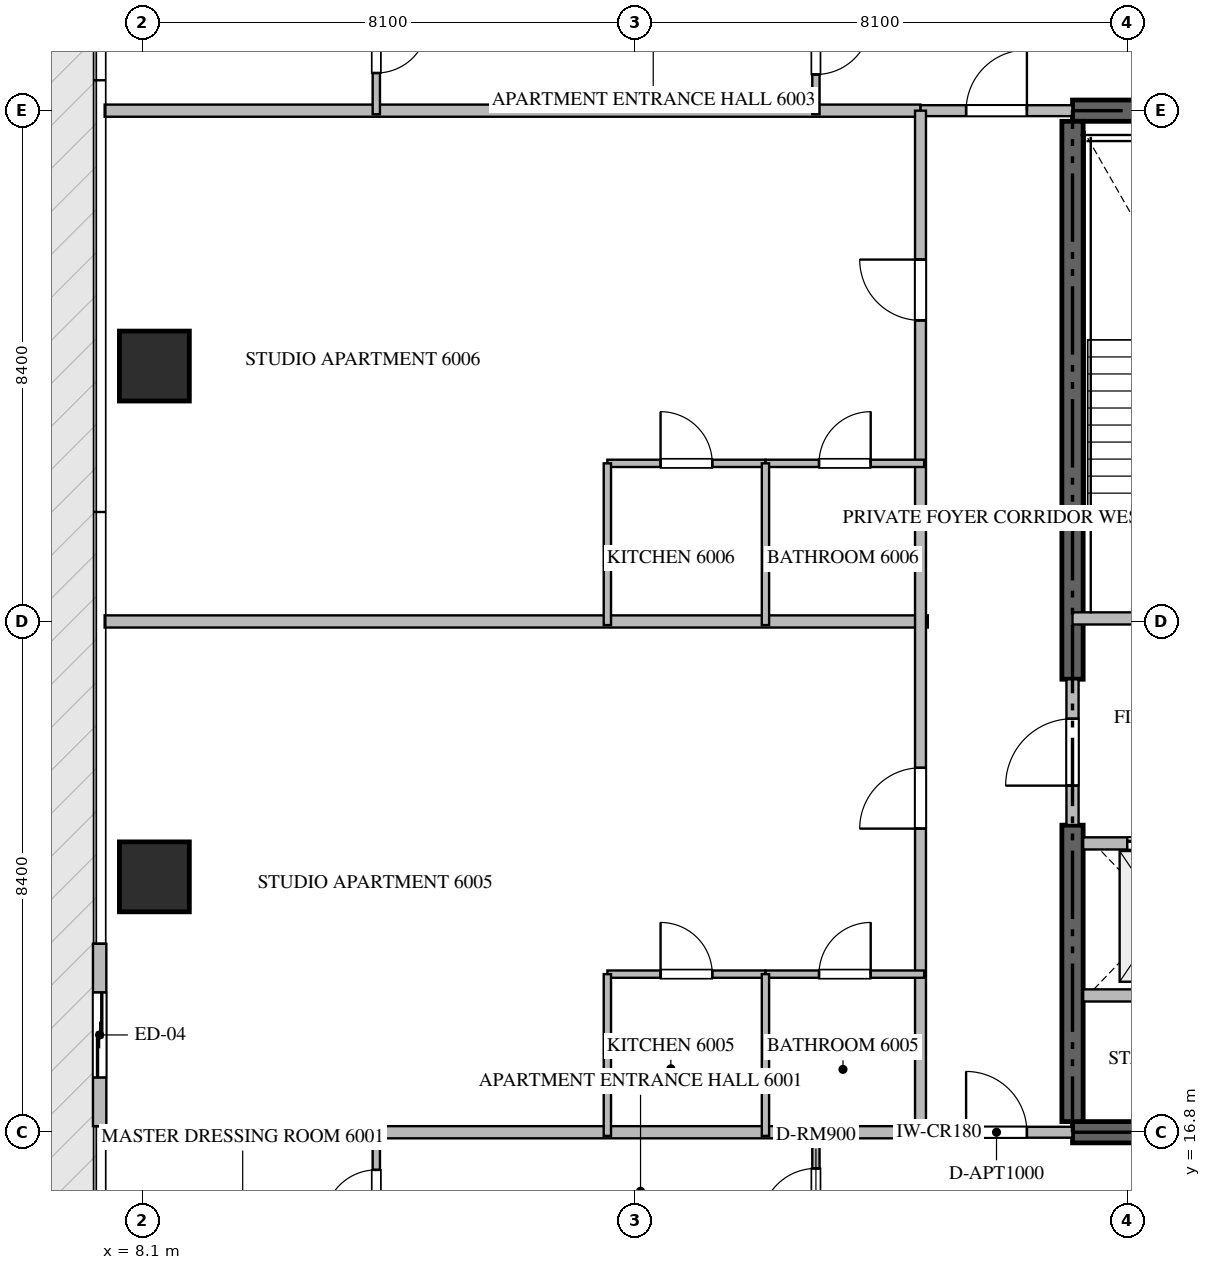
"""IFC4 building model, lengths in metres.
Left out: names, types, materials, properties, quantities, classifications, styles, units other than length and angle.
Written with IfcOpenShell. Run it as: python <this file> out.ifc"""

import sys

from ifc_helpers import new_model, si_unit, direction, frame, frame_2d, origin, origin_2d, place, context, subcontext, project, spatial, rectangle, extrude, source, transform, mapped, element, fill, save


model = new_model("IFC4")
c1 = context("Model", 3, precision=1e-05, world=origin(), true_north=direction((0.0, 1.0)))
c2 = subcontext(c1, "Body", "Model", "MODEL_VIEW")
j1 = project(units=[si_unit("LENGTHUNIT", "METRE"), si_unit("PLANEANGLEUNIT", "RADIAN")], contexts=[c1])
p1 = place(None, origin())
s1 = spatial("IfcSite", under=j1, at=p1, CompositionType="ELEMENT")
p2 = place(p1, origin())
s2 = spatial("IfcBuilding", under=s1, at=p2, CompositionType="ELEMENT")
p3 = place(p2, frame((0.0, 0.0, 241.25)))
s3 = spatial("IfcBuildingStorey", under=s2, at=p3, CompositionType="ELEMENT", Elevation=241.25)
for number, where, z_axis, x_axis in (
    (1, (23.4, 16.8, -0.26), (0.0, 0.0, 1.0), (1.0, 0.0, 0.0)),
    (2, (41.4, 33.6, -0.26), (0.0, 0.0, 1.0), (-1.0, 0.0, 0.0)),
):
    element("IfcWall", number, at=place(p3, frame(where, z_axis=z_axis, x_axis=x_axis)), inside=s3, PredefinedType="SHEAR", context=c2, shape_type="SweptSolid", body=[
        extrude(rectangle(XDim=18.0, YDim=0.35, at=frame_2d((9.0, 0.0))), origin(), (0.0, 0.0, 1.0), 3.848),
    ])
p4 = place(p3, frame((23.4, 16.975, -0.26), z_axis=(0.0, 0.0, 1.0), x_axis=(0.0, 1.0, 0.0)))
e3 = element("IfcWall", 3, at=p4, inside=s3, PredefinedType="SHEAR", context=c2, shape_type="SweptSolid", body=[
    extrude(rectangle(XDim=4.875, YDim=0.35, at=frame_2d((2.438, 0.0))), origin(), (0.0, 0.0, 1.0), 3.848),
])
p5 = place(p3, frame((23.4, 24.25, -0.26), z_axis=(0.0, 0.0, 1.0), x_axis=(0.0, 1.0, 0.0)))
e4 = element("IfcWall", 4, at=p5, inside=s3, PredefinedType="SHEAR", context=c2, shape_type="SweptSolid", body=[
    extrude(rectangle(XDim=9.175, YDim=0.35, at=frame_2d((4.587, 0.0))), origin(), (0.0, 0.0, 1.0), 3.848),
])
m1 = source(origin(), c2, "Body", "SweptSolid", [
    extrude(rectangle(XDim=1.15, YDim=1.15, at=origin_2d()), origin(), (0.0, 0.0, 1.0), 3.85),
])
for number, where, z_axis, x_axis in (
    (5, (8.3, 21.0, -0.26), (0.0, 0.0, 1.0), (1.0, 0.0, 0.0)),
    (6, (8.3, 29.4, -0.26), (0.0, 0.0, 1.0), (1.0, 0.0, 0.0)),
):
    element("IfcColumn", number, at=place(p3, frame(where, z_axis=z_axis, x_axis=x_axis)), inside=s3, PredefinedType="COLUMN", context=c2, shape_type="MappedRepresentation", body=[
        mapped(m1, transform((0.0, 0.0, 0.0), scale=1.0)),
    ])
p6 = place(p3, frame((7.4, 19.9, 0.0), z_axis=(0.0, 0.0, 1.0), x_axis=(0.0, -1.0, 0.0)))
e7 = element("IfcWall", 7, at=p6, inside=s3, PredefinedType="ELEMENTEDWALL", context=c2, shape_type="SweptSolid", body=[
    extrude(rectangle(XDim=3.0, YDim=0.22, at=frame_2d((1.5, 0.0))), origin(), (0.0, 0.0, 1.0), 3.575),
])
p7 = place(p6, frame((0.8, 0.0, 0.0)))
e8 = element("IfcOpeningElement", 8, at=p7, cuts=e7, PredefinedType="OPENING", context=c2, shape_type="SweptSolid", body=[
    extrude(rectangle(XDim=1.4, YDim=2.25, at=frame_2d((0.7, 1.125))), frame((0.0, 0.12, 0.0), z_axis=(0.0, -1.0, 0.0), x_axis=(1.0, 0.0, 0.0)), (0.0, 0.0, 1.0), 0.24),
])
p8 = place(p3, frame((23.4, 25.25, 0.0), z_axis=(0.0, 0.0, 1.0), x_axis=(1.0, 0.0, 0.0)))
e9 = element("IfcWall", 9, at=p8, inside=s3, PredefinedType="STANDARD", context=c2, shape_type="SweptSolid", body=[
    extrude(rectangle(XDim=4.45, YDim=0.2, at=frame_2d((2.225, 0.0))), origin(), (0.0, 0.0, 1.0), 3.59),
])
p9 = place(p8, frame((1.65, 0.0, 0.0)))
e10 = element("IfcOpeningElement", 10, at=p9, cuts=e9, PredefinedType="OPENING", context=c2, shape_type="SweptSolid", body=[
    extrude(rectangle(XDim=1.1, YDim=2.15, at=frame_2d((0.55, 1.075))), frame((0.0, 0.11, 0.0), z_axis=(0.0, -1.0, 0.0), x_axis=(1.0, 0.0, 0.0)), (0.0, 0.0, 1.0), 0.22),
])
p10 = place(p3, frame((23.575, 21.55, 0.0), z_axis=(0.0, 0.0, 1.0), x_axis=(1.0, 0.0, 0.0)))
e11 = element("IfcWall", 11, at=p10, inside=s3, PredefinedType="STANDARD", context=c2, shape_type="SweptSolid", body=[
    extrude(rectangle(XDim=2.475, YDim=0.2, at=frame_2d((1.238, 0.0))), origin(), (0.0, 0.0, 1.0), 3.59),
])
p11 = place(p10, frame((0.725, 0.0, 0.0)))
e12 = element("IfcOpeningElement", 12, at=p11, cuts=e11, PredefinedType="OPENING", context=c2, shape_type="SweptSolid", body=[
    extrude(rectangle(XDim=1.2, YDim=2.2, at=frame_2d((0.6, 1.1))), frame((0.0, 0.11, 0.0), z_axis=(0.0, -1.0, 0.0), x_axis=(1.0, 0.0, 0.0)), (0.0, 0.0, 1.0), 0.22),
])
p12 = place(p3, frame((23.575, 19.05, 0.0), z_axis=(0.0, 0.0, 1.0), x_axis=(1.0, 0.0, 0.0)))
e13 = element("IfcWall", 13, at=p12, inside=s3, PredefinedType="STANDARD", context=c2, shape_type="SweptSolid", body=[
    extrude(rectangle(XDim=2.475, YDim=0.2, at=frame_2d((1.238, 0.0))), origin(), (0.0, 0.0, 1.0), 3.59),
])
p13 = place(p3, frame((23.4, 21.852, 0.0), z_axis=(0.0, 0.0, 1.0), x_axis=(0.0, 1.0, 0.0)))
e14 = element("IfcWall", 14, at=p13, inside=s3, PredefinedType="STANDARD", context=c2, shape_type="SweptSolid", body=[
    extrude(rectangle(XDim=2.396, YDim=0.2, at=frame_2d((1.198, 0.0))), origin(), (0.0, 0.0, 1.0), 3.59),
])
p14 = place(p13, frame((0.648, 0.0, 0.0)))
e15 = element("IfcOpeningElement", 15, at=p14, cuts=e14, PredefinedType="OPENING", context=c2, shape_type="SweptSolid", body=[
    extrude(rectangle(XDim=1.1, YDim=2.15, at=frame_2d((0.55, 1.075))), frame((0.0, 0.11, 0.0), z_axis=(0.0, -1.0, 0.0), x_axis=(1.0, 0.0, 0.0)), (0.0, 0.0, 1.0), 0.22),
])
p15 = place(p3, frame((7.482, 25.2, 0.0), z_axis=(0.0, 0.0, 1.0), x_axis=(1.0, 0.0, 0.0)))
e16 = element("IfcWall", 16, at=p15, inside=s3, PredefinedType="PARTITIONING", context=c2, shape_type="SweptSolid", body=[
    extrude(rectangle(XDim=13.538, YDim=0.2, at=frame_2d((6.769, 0.0))), origin(), (0.0, 0.0, 1.0), 3.59),
])
for number, where, z_axis, x_axis in (
    (17, (7.482, 16.8, 0.0), (0.0, 0.0, 1.0), (1.0, 0.0, 0.0)),
    (18, (7.482, 33.6, 0.0), (0.0, 0.0, 1.0), (1.0, 0.0, 0.0)),
):
    element("IfcWall", number, at=place(p3, frame(where, z_axis=z_axis, x_axis=x_axis)), inside=s3, PredefinedType="PARTITIONING", context=c2, shape_type="SweptSolid", body=[
        extrude(rectangle(XDim=13.418, YDim=0.2, at=frame_2d((6.709, 0.0))), origin(), (0.0, 0.0, 1.0), 3.59),
    ])
p16 = place(p3, frame((20.902, 16.8, 0.0), z_axis=(0.0, 0.0, 1.0), x_axis=(1.0, 0.0, 0.0)))
e19 = element("IfcWall", 19, at=p16, inside=s3, PredefinedType="PARTITIONING", context=c2, shape_type="SweptSolid", body=[
    extrude(rectangle(XDim=2.496, YDim=0.18, at=frame_2d((1.248, 0.0))), origin(), (0.0, 0.0, 1.0), 3.59),
])
p17 = place(p16, frame((0.748, 0.0, 0.0)))
e20 = element("IfcOpeningElement", 20, at=p17, cuts=e19, PredefinedType="OPENING", context=c2, shape_type="SweptSolid", body=[
    extrude(rectangle(XDim=1.0, YDim=2.15, at=frame_2d((0.5, 1.075))), frame((0.0, 0.1, 0.0), z_axis=(0.0, -1.0, 0.0), x_axis=(1.0, 0.0, 0.0)), (0.0, 0.0, 1.0), 0.2),
])
p18 = place(p3, frame((20.902, 33.6, 0.0), z_axis=(0.0, 0.0, 1.0), x_axis=(1.0, 0.0, 0.0)))
e21 = element("IfcWall", 21, at=p18, inside=s3, PredefinedType="PARTITIONING", context=c2, shape_type="SweptSolid", body=[
    extrude(rectangle(XDim=2.496, YDim=0.18, at=frame_2d((1.248, 0.0))), origin(), (0.0, 0.0, 1.0), 3.59),
])
p19 = place(p18, frame((0.748, 0.0, 0.0)))
e22 = element("IfcOpeningElement", 22, at=p19, cuts=e21, PredefinedType="OPENING", context=c2, shape_type="SweptSolid", body=[
    extrude(rectangle(XDim=1.0, YDim=2.15, at=frame_2d((0.5, 1.075))), frame((0.0, 0.1, 0.0), z_axis=(0.0, -1.0, 0.0), x_axis=(1.0, 0.0, 0.0)), (0.0, 0.0, 1.0), 0.2),
])
p20 = place(p3, frame((20.9, 16.8, 0.0), z_axis=(0.0, 0.0, 1.0), x_axis=(0.0, 1.0, 0.0)))
e23 = element("IfcWall", 23, at=p20, inside=s3, PredefinedType="PARTITIONING", context=c2, shape_type="SweptSolid", body=[
    extrude(rectangle(XDim=16.8, YDim=0.18, at=frame_2d((8.4, 0.0))), origin(), (0.0, 0.0, 1.0), 3.59),
])
p21 = place(p20, frame((4.993, 0.0, 0.0)))
e24 = element("IfcOpeningElement", 24, at=p21, cuts=e23, PredefinedType="OPENING", context=c2, shape_type="SweptSolid", body=[
    extrude(rectangle(XDim=1.0, YDim=2.15, at=frame_2d((0.5, 1.075))), frame((0.0, 0.1, 0.0), z_axis=(0.0, -1.0, 0.0), x_axis=(1.0, 0.0, 0.0)), (0.0, 0.0, 1.0), 0.2),
])
p22 = place(p20, frame((13.351, 0.0, 0.0)))
e25 = element("IfcOpeningElement", 25, at=p22, cuts=e23, PredefinedType="OPENING", context=c2, shape_type="SweptSolid", body=[
    extrude(rectangle(XDim=1.0, YDim=2.15, at=frame_2d((0.5, 1.075))), frame((0.0, 0.1, 0.0), z_axis=(0.0, -1.0, 0.0), x_axis=(1.0, 0.0, 0.0)), (0.0, 0.0, 1.0), 0.2),
])
p23 = place(p3, frame((19.18, 14.65, 0.0), z_axis=(0.0, 0.0, 1.0), x_axis=(0.0, 1.0, 0.0)))
e26 = element("IfcWall", 26, at=p23, inside=s3, PredefinedType="PARTITIONING", context=c2, shape_type="SweptSolid", body=[
    extrude(rectangle(XDim=2.21, YDim=0.12, at=frame_2d((1.105, 0.0))), origin(), (0.0, 0.0, 1.0), 3.59),
])
p24 = place(p23, frame((0.655, 0.0, 0.0)))
e27 = element("IfcOpeningElement", 27, at=p24, cuts=e26, PredefinedType="OPENING", context=c2, shape_type="SweptSolid", body=[
    extrude(rectangle(XDim=0.9, YDim=2.1, at=frame_2d((0.45, 1.05))), frame((0.0, 0.07, 0.0), z_axis=(0.0, -1.0, 0.0), x_axis=(1.0, 0.0, 0.0)), (0.0, 0.0, 1.0), 0.14),
])
p25 = place(p3, frame((11.95, 14.652, 0.0), z_axis=(0.0, 0.0, 1.0), x_axis=(0.0, 1.0, 0.0)))
e28 = element("IfcWall", 28, at=p25, inside=s3, PredefinedType="PARTITIONING", context=c2, shape_type="SweptSolid", body=[
    extrude(rectangle(XDim=2.208, YDim=0.12, at=frame_2d((1.104, 0.0))), origin(), (0.0, 0.0, 1.0), 3.59),
])
p26 = place(p25, frame((0.679, 0.0, 0.0)))
e29 = element("IfcOpeningElement", 29, at=p26, cuts=e28, PredefinedType="OPENING", context=c2, shape_type="SweptSolid", body=[
    extrude(rectangle(XDim=0.85, YDim=2.1, at=frame_2d((0.425, 1.05))), frame((0.0, 0.07, 0.0), z_axis=(0.0, -1.0, 0.0), x_axis=(1.0, 0.0, 0.0)), (0.0, 0.0, 1.0), 0.14),
])
p27 = place(p3, frame((19.18, 35.75, 0.0), z_axis=(0.0, 0.0, 1.0), x_axis=(0.0, -1.0, 0.0)))
e30 = element("IfcWall", 30, at=p27, inside=s3, PredefinedType="PARTITIONING", context=c2, shape_type="SweptSolid", body=[
    extrude(rectangle(XDim=2.21, YDim=0.12, at=frame_2d((1.105, 0.0))), origin(), (0.0, 0.0, 1.0), 3.59),
])
p28 = place(p27, frame((0.655, 0.0, 0.0)))
e31 = element("IfcOpeningElement", 31, at=p28, cuts=e30, PredefinedType="OPENING", context=c2, shape_type="SweptSolid", body=[
    extrude(rectangle(XDim=0.9, YDim=2.1, at=frame_2d((0.45, 1.05))), frame((0.0, 0.07, 0.0), z_axis=(0.0, -1.0, 0.0), x_axis=(1.0, 0.0, 0.0)), (0.0, 0.0, 1.0), 0.14),
])
p29 = place(p3, frame((11.95, 35.748, 0.0), z_axis=(0.0, 0.0, 1.0), x_axis=(0.0, -1.0, 0.0)))
e32 = element("IfcWall", 32, at=p29, inside=s3, PredefinedType="PARTITIONING", context=c2, shape_type="SweptSolid", body=[
    extrude(rectangle(XDim=2.208, YDim=0.12, at=frame_2d((1.104, 0.0))), origin(), (0.0, 0.0, 1.0), 3.59),
])
p30 = place(p29, frame((0.679, 0.0, 0.0)))
e33 = element("IfcOpeningElement", 33, at=p30, cuts=e32, PredefinedType="OPENING", context=c2, shape_type="SweptSolid", body=[
    extrude(rectangle(XDim=0.85, YDim=2.1, at=frame_2d((0.425, 1.05))), frame((0.0, 0.07, 0.0), z_axis=(0.0, -1.0, 0.0), x_axis=(1.0, 0.0, 0.0)), (0.0, 0.0, 1.0), 0.14),
])
p31 = place(p3, frame((15.75, 19.4, 0.0), z_axis=(0.0, 0.0, 1.0), x_axis=(1.0, 0.0, 0.0)))
e34 = element("IfcWall", 34, at=p31, inside=s3, PredefinedType="PARTITIONING", context=c2, shape_type="SweptSolid", body=[
    extrude(rectangle(XDim=2.6, YDim=0.12, at=frame_2d((1.3, 0.0))), origin(), (0.0, 0.0, 1.0), 3.59),
])
p32 = place(p31, frame((0.875, 0.0, 0.0)))
e35 = element("IfcOpeningElement", 35, at=p32, cuts=e34, PredefinedType="OPENING", context=c2, shape_type="SweptSolid", body=[
    extrude(rectangle(XDim=0.85, YDim=2.1, at=frame_2d((0.425, 1.05))), frame((0.0, 0.07, 0.0), z_axis=(0.0, -1.0, 0.0), x_axis=(1.0, 0.0, 0.0)), (0.0, 0.0, 1.0), 0.14),
])
p33 = place(p3, frame((18.352, 19.4, 0.0), z_axis=(0.0, 0.0, 1.0), x_axis=(1.0, 0.0, 0.0)))
e36 = element("IfcWall", 36, at=p33, inside=s3, PredefinedType="PARTITIONING", context=c2, shape_type="SweptSolid", body=[
    extrude(rectangle(XDim=2.608, YDim=0.12, at=frame_2d((1.304, 0.0))), origin(), (0.0, 0.0, 1.0), 3.59),
])
p34 = place(p33, frame((0.879, 0.0, 0.0)))
e37 = element("IfcOpeningElement", 37, at=p34, cuts=e36, PredefinedType="OPENING", context=c2, shape_type="SweptSolid", body=[
    extrude(rectangle(XDim=0.85, YDim=2.1, at=frame_2d((0.425, 1.05))), frame((0.0, 0.07, 0.0), z_axis=(0.0, -1.0, 0.0), x_axis=(1.0, 0.0, 0.0)), (0.0, 0.0, 1.0), 0.14),
])
for number, where, z_axis, x_axis in (
    (38, (18.35, 16.74, 0.0), (0.0, 0.0, 1.0), (0.0, 1.0, 0.0)),
    (39, (15.75, 16.74, 0.0), (0.0, 0.0, 1.0), (0.0, 1.0, 0.0)),
):
    element("IfcWall", number, at=place(p3, frame(where, z_axis=z_axis, x_axis=x_axis)), inside=s3, PredefinedType="PARTITIONING", context=c2, shape_type="SweptSolid", body=[
        extrude(rectangle(XDim=2.66, YDim=0.12, at=frame_2d((1.33, 0.0))), origin(), (0.0, 0.0, 1.0), 3.59),
    ])
p35 = place(p3, frame((15.75, 27.8, 0.0), z_axis=(0.0, 0.0, 1.0), x_axis=(1.0, 0.0, 0.0)))
e40 = element("IfcWall", 40, at=p35, inside=s3, PredefinedType="PARTITIONING", context=c2, shape_type="SweptSolid", body=[
    extrude(rectangle(XDim=2.6, YDim=0.12, at=frame_2d((1.3, 0.0))), origin(), (0.0, 0.0, 1.0), 3.59),
])
p36 = place(p35, frame((0.875, 0.0, 0.0)))
e41 = element("IfcOpeningElement", 41, at=p36, cuts=e40, PredefinedType="OPENING", context=c2, shape_type="SweptSolid", body=[
    extrude(rectangle(XDim=0.85, YDim=2.1, at=frame_2d((0.425, 1.05))), frame((0.0, 0.07, 0.0), z_axis=(0.0, -1.0, 0.0), x_axis=(1.0, 0.0, 0.0)), (0.0, 0.0, 1.0), 0.14),
])
p37 = place(p3, frame((18.352, 27.8, 0.0), z_axis=(0.0, 0.0, 1.0), x_axis=(1.0, 0.0, 0.0)))
e42 = element("IfcWall", 42, at=p37, inside=s3, PredefinedType="PARTITIONING", context=c2, shape_type="SweptSolid", body=[
    extrude(rectangle(XDim=2.608, YDim=0.12, at=frame_2d((1.304, 0.0))), origin(), (0.0, 0.0, 1.0), 3.59),
])
p38 = place(p37, frame((0.879, 0.0, 0.0)))
e43 = element("IfcOpeningElement", 43, at=p38, cuts=e42, PredefinedType="OPENING", context=c2, shape_type="SweptSolid", body=[
    extrude(rectangle(XDim=0.85, YDim=2.1, at=frame_2d((0.425, 1.05))), frame((0.0, 0.07, 0.0), z_axis=(0.0, -1.0, 0.0), x_axis=(1.0, 0.0, 0.0)), (0.0, 0.0, 1.0), 0.14),
])
for number, where, z_axis, x_axis in (
    (44, (18.35, 25.14, 0.0), (0.0, 0.0, 1.0), (0.0, 1.0, 0.0)),
    (45, (15.75, 25.14, 0.0), (0.0, 0.0, 1.0), (0.0, 1.0, 0.0)),
):
    element("IfcWall", number, at=place(p3, frame(where, z_axis=z_axis, x_axis=x_axis)), inside=s3, PredefinedType="PARTITIONING", context=c2, shape_type="SweptSolid", body=[
        extrude(rectangle(XDim=2.66, YDim=0.12, at=frame_2d((1.33, 0.0))), origin(), (0.0, 0.0, 1.0), 3.59),
    ])
m2 = source(origin(), c2, "Body", "SweptSolid", [
    extrude(rectangle(XDim=1.4, YDim=2.25, at=frame_2d((0.7, 1.125))), frame((0.0, 0.025, 0.0), z_axis=(0.0, -1.0, 0.0), x_axis=(1.0, 0.0, 0.0)), (0.0, 0.0, 1.0), 0.05),
])
p39 = place(p7, origin())
e46 = element("IfcDoor", 46, at=p39, inside=s3, OperationType="SLIDING_TO_LEFT", PredefinedType="DOOR", context=c2, shape_type="MappedRepresentation", body=[
    mapped(m2, transform((0.0, 0.0, 0.0), scale=1.0)),
])
fill(e8, e46)
m3 = source(origin(), c2, "Body", "SweptSolid", [
    extrude(rectangle(XDim=1.2, YDim=2.2, at=frame_2d((0.6, 1.1))), frame((0.0, 0.025, 0.0), z_axis=(0.0, -1.0, 0.0), x_axis=(1.0, 0.0, 0.0)), (0.0, 0.0, 1.0), 0.05),
])
p40 = place(p11, origin())
e47 = element("IfcDoor", 47, at=p40, inside=s3, OperationType="DOUBLE_DOOR_SLIDING", PredefinedType="DOOR", context=c2, shape_type="MappedRepresentation", body=[
    mapped(m3, transform((0.0, 0.0, 0.0), scale=1.0)),
])
fill(e12, e47)
m4 = source(origin(), c2, "Body", "SweptSolid", [
    extrude(rectangle(XDim=1.1, YDim=2.15, at=frame_2d((0.55, 1.075))), frame((0.0, 0.025, 0.0), z_axis=(0.0, -1.0, 0.0), x_axis=(1.0, 0.0, 0.0)), (0.0, 0.0, 1.0), 0.05),
])
p41 = place(p14, origin())
e48 = element("IfcDoor", 48, at=p41, inside=s3, OperationType="SINGLE_SWING_LEFT", PredefinedType="DOOR", context=c2, shape_type="MappedRepresentation", body=[
    mapped(m4, transform((0.0, 0.0, 0.0), scale=1.0)),
])
fill(e15, e48)
m5 = source(origin(), c2, "Body", "SweptSolid", [
    extrude(rectangle(XDim=1.0, YDim=2.15, at=frame_2d((0.5, 1.075))), frame((0.0, 0.025, 0.0), z_axis=(0.0, -1.0, 0.0), x_axis=(1.0, 0.0, 0.0)), (0.0, 0.0, 1.0), 0.05),
])
p42 = place(p17, origin())
e49 = element("IfcDoor", 49, at=p42, inside=s3, OperationType="SINGLE_SWING_LEFT", PredefinedType="DOOR", context=c2, shape_type="MappedRepresentation", body=[
    mapped(m5, transform((0.0, 0.0, 0.0), scale=1.0)),
])
fill(e20, e49)
p43 = place(p19, origin())
e50 = element("IfcDoor", 50, at=p43, inside=s3, OperationType="SINGLE_SWING_RIGHT", PredefinedType="DOOR", context=c2, shape_type="MappedRepresentation", body=[
    mapped(m5, transform((0.0, 0.0, 0.0), scale=1.0)),
])
fill(e22, e50)
p44 = place(p21, origin())
e51 = element("IfcDoor", 51, at=p44, inside=s3, OperationType="SINGLE_SWING_LEFT", PredefinedType="DOOR", context=c2, shape_type="MappedRepresentation", body=[
    mapped(m5, transform((0.0, 0.0, 0.0), scale=1.0)),
])
fill(e24, e51)
p45 = place(p22, origin())
e52 = element("IfcDoor", 52, at=p45, inside=s3, OperationType="SINGLE_SWING_RIGHT", PredefinedType="DOOR", context=c2, shape_type="MappedRepresentation", body=[
    mapped(m5, transform((0.0, 0.0, 0.0), scale=1.0)),
])
fill(e25, e52)
m6 = source(origin(), c2, "Body", "SweptSolid", [
    extrude(rectangle(XDim=0.9, YDim=2.1, at=frame_2d((0.45, 1.05))), frame((0.0, 0.025, 0.0), z_axis=(0.0, -1.0, 0.0), x_axis=(1.0, 0.0, 0.0)), (0.0, 0.0, 1.0), 0.05),
])
p46 = place(p24, origin())
e53 = element("IfcDoor", 53, at=p46, inside=s3, OperationType="SINGLE_SWING_LEFT", PredefinedType="DOOR", context=c2, shape_type="MappedRepresentation", body=[
    mapped(m6, transform((0.0, 0.0, 0.0), scale=1.0)),
])
fill(e27, e53)
m7 = source(origin(), c2, "Body", "SweptSolid", [
    extrude(rectangle(XDim=0.85, YDim=2.1, at=frame_2d((0.425, 1.05))), frame((0.0, 0.025, 0.0), z_axis=(0.0, -1.0, 0.0), x_axis=(1.0, 0.0, 0.0)), (0.0, 0.0, 1.0), 0.05),
])
p47 = place(p26, origin())
e54 = element("IfcDoor", 54, at=p47, inside=s3, OperationType="SINGLE_SWING_LEFT", PredefinedType="DOOR", context=c2, shape_type="MappedRepresentation", body=[
    mapped(m7, transform((0.0, 0.0, 0.0), scale=1.0)),
])
fill(e29, e54)
p48 = place(p28, origin())
e55 = element("IfcDoor", 55, at=p48, inside=s3, OperationType="SINGLE_SWING_LEFT", PredefinedType="DOOR", context=c2, shape_type="MappedRepresentation", body=[
    mapped(m6, transform((0.0, 0.0, 0.0), scale=1.0)),
])
fill(e31, e55)
p49 = place(p30, origin())
e56 = element("IfcDoor", 56, at=p49, inside=s3, OperationType="SINGLE_SWING_LEFT", PredefinedType="DOOR", context=c2, shape_type="MappedRepresentation", body=[
    mapped(m7, transform((0.0, 0.0, 0.0), scale=1.0)),
])
fill(e33, e56)
p50 = place(p32, origin())
e57 = element("IfcDoor", 57, at=p50, inside=s3, OperationType="SINGLE_SWING_LEFT", PredefinedType="DOOR", context=c2, shape_type="MappedRepresentation", body=[
    mapped(m7, transform((0.0, 0.0, 0.0), scale=1.0)),
])
fill(e35, e57)
p51 = place(p34, origin())
e58 = element("IfcDoor", 58, at=p51, inside=s3, OperationType="SINGLE_SWING_RIGHT", PredefinedType="DOOR", context=c2, shape_type="MappedRepresentation", body=[
    mapped(m7, transform((0.0, 0.0, 0.0), scale=1.0)),
])
fill(e37, e58)
p52 = place(p36, origin())
e59 = element("IfcDoor", 59, at=p52, inside=s3, OperationType="SINGLE_SWING_LEFT", PredefinedType="DOOR", context=c2, shape_type="MappedRepresentation", body=[
    mapped(m7, transform((0.0, 0.0, 0.0), scale=1.0)),
])
fill(e41, e59)
p53 = place(p38, origin())
e60 = element("IfcDoor", 60, at=p53, inside=s3, OperationType="SINGLE_SWING_RIGHT", PredefinedType="DOOR", context=c2, shape_type="MappedRepresentation", body=[
    mapped(m7, transform((0.0, 0.0, 0.0), scale=1.0)),
])
fill(e43, e60)
save(model, sys.argv[1])
